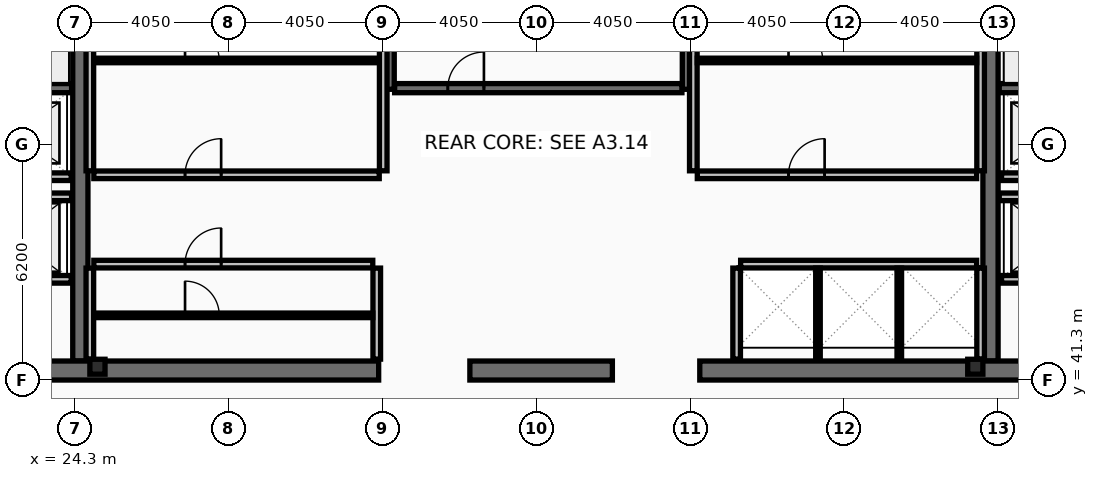
"""IFC4 building model, lengths in metres.
Left out: names, types, materials, properties, quantities, classifications, styles, units other than length and angle.
Written with IfcOpenShell. Run it as: python <this file> out.ifc"""

import sys

from ifc_helpers import new_model, si_unit, direction, frame, frame_2d, origin, origin_2d, place, context, subcontext, project, spatial, rectangle, i_section, extrude, element, fill, save


model = new_model("IFC4")
c1 = context("Model", 3, precision=1e-05, world=origin(), true_north=direction((0.0, 1.0)))
c2 = subcontext(c1, "Body", "Model", "MODEL_VIEW")
j1 = project(units=[si_unit("LENGTHUNIT", "METRE"), si_unit("PLANEANGLEUNIT", "RADIAN")], contexts=[c1])
p1 = place(None, origin())
s1 = spatial("IfcSite", under=j1, at=p1, CompositionType="ELEMENT")
p2 = place(p1, origin())
s2 = spatial("IfcBuilding", under=s1, at=p2, CompositionType="ELEMENT")
p3 = place(p2, frame((0.0, 0.0, 350.6)))
s3 = spatial("IfcBuildingStorey", under=s2, at=p3, CompositionType="ELEMENT", Elevation=350.6)
for number, where, z_axis, x_axis in (
    (1, (24.45, 41.8, 0.0), (0.0, 0.0, 1.0), (0.0, 1.0, 0.0)),
    (2, (48.4, 41.8, 0.0), (0.0, 0.0, 1.0), (0.0, 1.0, 0.0)),
):
    element("IfcWall", number, at=place(p3, frame(where, z_axis=z_axis, x_axis=x_axis)), inside=s3, PredefinedType="SHEAR", context=c2, shape_type="SweptSolid", body=[
        extrude(rectangle(XDim=11.4, YDim=0.4, at=frame_2d((5.7, 0.0))), origin(), (0.0, 0.0, 1.0), 5.4),
    ])
p4 = place(p3, frame((32.3, 41.55, 0.0), z_axis=(0.0, 0.0, 1.0), x_axis=(-1.0, 0.0, 0.0)))
e3 = element("IfcWall", 3, at=p4, inside=s3, PredefinedType="SHEAR", context=c2, shape_type="SweptSolid", body=[
    extrude(rectangle(XDim=11.45, YDim=0.5, at=frame_2d((5.725, 0.0))), origin(), (0.0, 0.0, 1.0), 5.4),
])
p5 = place(p3, frame((38.45, 41.55, 0.0), z_axis=(0.0, 0.0, 1.0), x_axis=(-1.0, 0.0, 0.0)))
e4 = element("IfcWall", 4, at=p5, inside=s3, PredefinedType="SHEAR", context=c2, shape_type="SweptSolid", body=[
    extrude(rectangle(XDim=3.75, YDim=0.5, at=frame_2d((1.875, 0.0))), origin(), (0.0, 0.0, 1.0), 5.4),
])
p6 = place(p3, frame((52.05, 41.55, 0.0), z_axis=(0.0, 0.0, 1.0), x_axis=(-1.0, 0.0, 0.0)))
e5 = element("IfcWall", 5, at=p6, inside=s3, PredefinedType="SHEAR", context=c2, shape_type="SweptSolid", body=[
    extrude(rectangle(XDim=11.3, YDim=0.5, at=frame_2d((5.65, 0.0))), origin(), (0.0, 0.0, 1.0), 5.4),
])
for number, where, z_axis, x_axis in (
    (6, (32.58, 48.95, 0.0), (0.0, 0.0, 1.0), (0.0, 1.0, 0.0)),
    (7, (40.42, 48.95, 0.0), (0.0, 0.0, 1.0), (0.0, 1.0, 0.0)),
):
    element("IfcWall", number, at=place(p3, frame(where, z_axis=z_axis, x_axis=x_axis)), inside=s3, PredefinedType="SHEAR", context=c2, shape_type="SweptSolid", body=[
        extrude(rectangle(XDim=4.25, YDim=0.26, at=frame_2d((2.125, 0.0))), origin(), (0.0, 0.0, 1.0), 5.4),
    ])
p7 = place(p3, frame((16.7, 48.98, 0.0), z_axis=(0.0, 0.0, 1.0), x_axis=(1.0, 0.0, 0.0)))
e8 = element("IfcWall", 8, at=p7, inside=s3, PredefinedType="SHEAR", context=c2, shape_type="SweptSolid", body=[
    extrude(rectangle(XDim=7.52, YDim=0.24, at=frame_2d((3.76, 0.0))), origin(), (0.0, 0.0, 1.0), 5.4),
])
p8 = place(p7, frame((0.22, 0.0, 0.0)))
e9 = element("IfcOpeningElement", 9, at=p8, cuts=e8, PredefinedType="OPENING", context=c2, shape_type="SweptSolid", body=[
    extrude(rectangle(XDim=1.05, YDim=2.15, at=frame_2d((0.525, 1.075))), frame((0.0, 0.13, 0.0), z_axis=(0.0, -1.0, 0.0), x_axis=(1.0, 0.0, 0.0)), (0.0, 0.0, 1.0), 0.26),
])
p9 = place(p3, frame((48.63, 48.98, 0.0), z_axis=(0.0, 0.0, 1.0), x_axis=(1.0, 0.0, 0.0)))
e10 = element("IfcWall", 10, at=p9, inside=s3, PredefinedType="SHEAR", context=c2, shape_type="SweptSolid", body=[
    extrude(rectangle(XDim=7.57, YDim=0.24, at=frame_2d((3.785, 0.0))), origin(), (0.0, 0.0, 1.0), 5.4),
])
p10 = place(p9, frame((6.3, 0.0, 0.0)))
e11 = element("IfcOpeningElement", 11, at=p10, cuts=e10, PredefinedType="OPENING", context=c2, shape_type="SweptSolid", body=[
    extrude(rectangle(XDim=1.05, YDim=2.15, at=frame_2d((0.525, 1.075))), frame((0.0, 0.13, 0.0), z_axis=(0.0, -1.0, 0.0), x_axis=(1.0, 0.0, 0.0)), (0.0, 0.0, 1.0), 0.26),
])
p11 = place(p3, frame((32.72, 48.98, 0.0), z_axis=(0.0, 0.0, 1.0), x_axis=(1.0, 0.0, 0.0)))
e12 = element("IfcWall", 12, at=p11, inside=s3, PredefinedType="SHEAR", context=c2, shape_type="SweptSolid", body=[
    extrude(rectangle(XDim=7.56, YDim=0.24, at=frame_2d((3.78, 0.0))), origin(), (0.0, 0.0, 1.0), 5.4),
])
p12 = place(p11, frame((1.4, 0.0, 0.0)))
e13 = element("IfcOpeningElement", 13, at=p12, cuts=e12, PredefinedType="OPENING", context=c2, shape_type="SweptSolid", body=[
    extrude(rectangle(XDim=0.95, YDim=2.1, at=frame_2d((0.475, 1.05))), frame((0.0, 0.13, 0.0), z_axis=(0.0, -1.0, 0.0), x_axis=(1.0, 0.0, 0.0)), (0.0, 0.0, 1.0), 0.26),
])
for number, where, z_axis, x_axis in (
    (14, (24.9, 41.65, 0.0), (0.0, 0.0, 1.0), (1.0, 0.0, 0.0)),
    (15, (48.0, 41.65, 0.0), (0.0, 0.0, 1.0), (1.0, 0.0, 0.0)),
):
    element("IfcColumn", number, at=place(p3, frame(where, z_axis=z_axis, x_axis=x_axis)), inside=s3, PredefinedType="COLUMN", context=c2, shape_type="SweptSolid", body=[
        extrude(i_section(OverallWidth=0.399, OverallDepth=0.393, WebThickness=0.023, FlangeThickness=0.037, at=origin_2d()), origin(), (0.0, 0.0, 1.0), 5.6),
    ])
p13 = place(p3, frame((51.61, 43.95, 0.0), z_axis=(0.0, 0.0, 1.0), x_axis=(-1.0, 0.0, 0.0)))
e16 = element("IfcWall", 16, at=p13, inside=s3, PredefinedType="PARTITIONING", context=c2, shape_type="SweptSolid", body=[
    extrude(rectangle(XDim=2.92, YDim=0.2, at=frame_2d((1.46, 0.0))), origin(), (0.0, 0.0, 1.0), 5.4),
])
p14 = place(p13, frame((0.81, 0.0, 0.0)))
e17 = element("IfcOpeningElement", 17, at=p14, cuts=e16, PredefinedType="OPENING", context=c2, shape_type="SweptSolid", body=[
    extrude(rectangle(XDim=1.3, YDim=2.18, at=frame_2d((0.65, 1.09))), frame((0.0, 0.11, 0.0), z_axis=(0.0, -1.0, 0.0), x_axis=(1.0, 0.0, 0.0)), (0.0, 0.0, 1.0), 0.22),
])
p15 = place(p3, frame((24.21, 43.95, 0.0), z_axis=(0.0, 0.0, 1.0), x_axis=(-1.0, 0.0, 0.0)))
e18 = element("IfcWall", 18, at=p15, inside=s3, PredefinedType="PARTITIONING", context=c2, shape_type="SweptSolid", body=[
    extrude(rectangle(XDim=2.97, YDim=0.2, at=frame_2d((1.485, 0.0))), origin(), (0.0, 0.0, 1.0), 5.4),
])
p16 = place(p15, frame((0.86, 0.0, 0.0)))
e19 = element("IfcOpeningElement", 19, at=p16, cuts=e18, PredefinedType="OPENING", context=c2, shape_type="SweptSolid", body=[
    extrude(rectangle(XDim=1.3, YDim=2.18, at=frame_2d((0.65, 1.09))), frame((0.0, 0.11, 0.0), z_axis=(0.0, -1.0, 0.0), x_axis=(1.0, 0.0, 0.0)), (0.0, 0.0, 1.0), 0.22),
])
p17 = place(p3, frame((51.61, 46.65, 0.0), z_axis=(0.0, 0.0, 1.0), x_axis=(-1.0, 0.0, 0.0)))
e20 = element("IfcWall", 20, at=p17, inside=s3, PredefinedType="PARTITIONING", context=c2, shape_type="SweptSolid", body=[
    extrude(rectangle(XDim=2.92, YDim=0.2, at=frame_2d((1.46, 0.0))), origin(), (0.0, 0.0, 1.0), 5.4),
])
p18 = place(p17, frame((0.86, 0.0, 0.0)))
e21 = element("IfcOpeningElement", 21, at=p18, cuts=e20, PredefinedType="OPENING", context=c2, shape_type="SweptSolid", body=[
    extrude(rectangle(XDim=1.2, YDim=2.18, at=frame_2d((0.6, 1.09))), frame((0.0, 0.11, 0.0), z_axis=(0.0, -1.0, 0.0), x_axis=(1.0, 0.0, 0.0)), (0.0, 0.0, 1.0), 0.22),
])
p19 = place(p3, frame((24.21, 46.65, 0.0), z_axis=(0.0, 0.0, 1.0), x_axis=(-1.0, 0.0, 0.0)))
e22 = element("IfcWall", 22, at=p19, inside=s3, PredefinedType="PARTITIONING", context=c2, shape_type="SweptSolid", body=[
    extrude(rectangle(XDim=2.97, YDim=0.2, at=frame_2d((1.485, 0.0))), origin(), (0.0, 0.0, 1.0), 5.4),
])
p20 = place(p19, frame((0.91, 0.0, 0.0)))
e23 = element("IfcOpeningElement", 23, at=p20, cuts=e22, PredefinedType="OPENING", context=c2, shape_type="SweptSolid", body=[
    extrude(rectangle(XDim=1.2, YDim=2.18, at=frame_2d((0.6, 1.09))), frame((0.0, 0.11, 0.0), z_axis=(0.0, -1.0, 0.0), x_axis=(1.0, 0.0, 0.0)), (0.0, 0.0, 1.0), 0.22),
])
p21 = place(p3, frame((21.2, 46.12, 0.0), z_axis=(0.0, 0.0, 1.0), x_axis=(1.0, 0.0, 0.0)))
e24 = element("IfcWall", 24, at=p21, inside=s3, PredefinedType="PARTITIONING", context=c2, shape_type="SweptSolid", body=[
    extrude(rectangle(XDim=3.02, YDim=0.2, at=frame_2d((1.51, 0.0))), origin(), (0.0, 0.0, 1.0), 5.4),
])
p22 = place(p3, frame((48.63, 46.12, 0.0), z_axis=(0.0, 0.0, 1.0), x_axis=(1.0, 0.0, 0.0)))
e25 = element("IfcWall", 25, at=p22, inside=s3, PredefinedType="PARTITIONING", context=c2, shape_type="SweptSolid", body=[
    extrude(rectangle(XDim=3.07, YDim=0.2, at=frame_2d((1.535, 0.0))), origin(), (0.0, 0.0, 1.0), 5.4),
])
for number, where, z_axis, x_axis in (
    (26, (24.7, 46.805, 0.0), (0.0, 0.0, 1.0), (0.0, 1.0, 0.0)),
    (27, (32.42, 46.805, 0.0), (0.0, 0.0, 1.0), (0.0, 1.0, 0.0)),
):
    element("IfcWall", number, at=place(p3, frame(where, z_axis=z_axis, x_axis=x_axis)), inside=s3, PredefinedType="PARTITIONING", context=c2, shape_type="SweptSolid", body=[
        extrude(rectangle(XDim=5.99, YDim=0.2, at=frame_2d((2.995, 0.0))), origin(), (0.0, 0.0, 1.0), 5.4),
    ])
p23 = place(p3, frame((24.805, 49.709, 0.0), z_axis=(0.0, 0.0, 1.0), x_axis=(1.0, 0.0, 0.0)))
e28 = element("IfcWall", 28, at=p23, inside=s3, PredefinedType="PARTITIONING", context=c2, shape_type="SweptSolid", body=[
    extrude(rectangle(XDim=7.51, YDim=0.12, at=frame_2d((3.755, 0.0))), origin(), (0.0, 0.0, 1.0), 5.4),
])
p24 = place(p23, frame((2.4, 0.0, 0.0)))
e29 = element("IfcOpeningElement", 29, at=p24, cuts=e28, PredefinedType="OPENING", context=c2, shape_type="SweptSolid", body=[
    extrude(rectangle(XDim=0.9, YDim=2.05, at=frame_2d((0.45, 1.025))), frame((0.0, 0.07, 0.0), z_axis=(0.0, -1.0, 0.0), x_axis=(1.0, 0.0, 0.0)), (0.0, 0.0, 1.0), 0.14),
])
p25 = place(p3, frame((24.805, 46.7, 0.0), z_axis=(0.0, 0.0, 1.0), x_axis=(1.0, 0.0, 0.0)))
e30 = element("IfcWall", 30, at=p25, inside=s3, PredefinedType="PARTITIONING", context=c2, shape_type="SweptSolid", body=[
    extrude(rectangle(XDim=7.51, YDim=0.2, at=frame_2d((3.755, 0.0))), origin(), (0.0, 0.0, 1.0), 5.4),
])
p26 = place(p25, frame((2.4, 0.0, 0.0)))
e31 = element("IfcOpeningElement", 31, at=p26, cuts=e30, PredefinedType="OPENING", context=c2, shape_type="SweptSolid", body=[
    extrude(rectangle(XDim=0.95, YDim=2.1, at=frame_2d((0.475, 1.05))), frame((0.0, 0.11, 0.0), z_axis=(0.0, -1.0, 0.0), x_axis=(1.0, 0.0, 0.0)), (0.0, 0.0, 1.0), 0.22),
])
for number, where, z_axis, x_axis in (
    (32, (24.7, 41.85, 0.0), (0.0, 0.0, 1.0), (0.0, 1.0, 0.0)),
    (33, (32.25, 41.85, 0.0), (0.0, 0.0, 1.0), (0.0, 1.0, 0.0)),
):
    element("IfcWall", number, at=place(p3, frame(where, z_axis=z_axis, x_axis=x_axis)), inside=s3, PredefinedType="PARTITIONING", context=c2, shape_type="SweptSolid", body=[
        extrude(rectangle(XDim=2.395, YDim=0.2, at=frame_2d((1.198, 0.0))), origin(), (0.0, 0.0, 1.0), 5.4),
    ])
p27 = place(p3, frame((24.805, 43.002, 0.0), z_axis=(0.0, 0.0, 1.0), x_axis=(1.0, 0.0, 0.0)))
e34 = element("IfcWall", 34, at=p27, inside=s3, PredefinedType="PARTITIONING", context=c2, shape_type="SweptSolid", body=[
    extrude(rectangle(XDim=7.34, YDim=0.12, at=frame_2d((3.67, 0.0))), origin(), (0.0, 0.0, 1.0), 5.4),
])
p28 = place(p27, frame((2.4, 0.0, 0.0)))
e35 = element("IfcOpeningElement", 35, at=p28, cuts=e34, PredefinedType="OPENING", context=c2, shape_type="SweptSolid", body=[
    extrude(rectangle(XDim=0.9, YDim=2.05, at=frame_2d((0.45, 1.025))), frame((0.0, 0.07, 0.0), z_axis=(0.0, -1.0, 0.0), x_axis=(1.0, 0.0, 0.0)), (0.0, 0.0, 1.0), 0.14),
])
p29 = place(p3, frame((24.805, 44.35, 0.0), z_axis=(0.0, 0.0, 1.0), x_axis=(1.0, 0.0, 0.0)))
e36 = element("IfcWall", 36, at=p29, inside=s3, PredefinedType="PARTITIONING", context=c2, shape_type="SweptSolid", body=[
    extrude(rectangle(XDim=7.34, YDim=0.2, at=frame_2d((3.67, 0.0))), origin(), (0.0, 0.0, 1.0), 5.4),
])
p30 = place(p29, frame((2.4, 0.0, 0.0)))
e37 = element("IfcOpeningElement", 37, at=p30, cuts=e36, PredefinedType="OPENING", context=c2, shape_type="SweptSolid", body=[
    extrude(rectangle(XDim=0.95, YDim=2.1, at=frame_2d((0.475, 1.05))), frame((0.0, 0.11, 0.0), z_axis=(0.0, -1.0, 0.0), x_axis=(1.0, 0.0, 0.0)), (0.0, 0.0, 1.0), 0.22),
])
for number, where, z_axis, x_axis in (
    (38, (40.58, 46.805, 0.0), (0.0, 0.0, 1.0), (0.0, 1.0, 0.0)),
    (39, (48.14, 46.805, 0.0), (0.0, 0.0, 1.0), (0.0, 1.0, 0.0)),
):
    element("IfcWall", number, at=place(p3, frame(where, z_axis=z_axis, x_axis=x_axis)), inside=s3, PredefinedType="PARTITIONING", context=c2, shape_type="SweptSolid", body=[
        extrude(rectangle(XDim=5.99, YDim=0.2, at=frame_2d((2.995, 0.0))), origin(), (0.0, 0.0, 1.0), 5.4),
    ])
p31 = place(p3, frame((40.685, 49.709, 0.0), z_axis=(0.0, 0.0, 1.0), x_axis=(1.0, 0.0, 0.0)))
e40 = element("IfcWall", 40, at=p31, inside=s3, PredefinedType="PARTITIONING", context=c2, shape_type="SweptSolid", body=[
    extrude(rectangle(XDim=7.35, YDim=0.12, at=frame_2d((3.675, 0.0))), origin(), (0.0, 0.0, 1.0), 5.4),
])
p32 = place(p31, frame((2.4, 0.0, 0.0)))
e41 = element("IfcOpeningElement", 41, at=p32, cuts=e40, PredefinedType="OPENING", context=c2, shape_type="SweptSolid", body=[
    extrude(rectangle(XDim=0.9, YDim=2.05, at=frame_2d((0.45, 1.025))), frame((0.0, 0.07, 0.0), z_axis=(0.0, -1.0, 0.0), x_axis=(1.0, 0.0, 0.0)), (0.0, 0.0, 1.0), 0.14),
])
p33 = place(p3, frame((40.685, 46.7, 0.0), z_axis=(0.0, 0.0, 1.0), x_axis=(1.0, 0.0, 0.0)))
e42 = element("IfcWall", 42, at=p33, inside=s3, PredefinedType="PARTITIONING", context=c2, shape_type="SweptSolid", body=[
    extrude(rectangle(XDim=7.35, YDim=0.2, at=frame_2d((3.675, 0.0))), origin(), (0.0, 0.0, 1.0), 5.4),
])
p34 = place(p33, frame((2.4, 0.0, 0.0)))
e43 = element("IfcOpeningElement", 43, at=p34, cuts=e42, PredefinedType="OPENING", context=c2, shape_type="SweptSolid", body=[
    extrude(rectangle(XDim=0.95, YDim=2.1, at=frame_2d((0.475, 1.05))), frame((0.0, 0.11, 0.0), z_axis=(0.0, -1.0, 0.0), x_axis=(1.0, 0.0, 0.0)), (0.0, 0.0, 1.0), 0.22),
])
p35 = place(p3, frame((41.825, 44.35, 0.0), z_axis=(0.0, 0.0, 1.0), x_axis=(1.0, 0.0, 0.0)))
e44 = element("IfcWall", 44, at=p35, inside=s3, PredefinedType="PARTITIONING", context=c2, shape_type="SweptSolid", body=[
    extrude(rectangle(XDim=6.21, YDim=0.2, at=frame_2d((3.105, 0.0))), origin(), (0.0, 0.0, 1.0), 5.4),
])
for number, where, z_axis, x_axis in (
    (45, (41.72, 41.85, 0.0), (0.0, 0.0, 1.0), (0.0, 1.0, 0.0)),
    (46, (48.14, 41.85, 0.0), (0.0, 0.0, 1.0), (0.0, 1.0, 0.0)),
):
    element("IfcWall", number, at=place(p3, frame(where, z_axis=z_axis, x_axis=x_axis)), inside=s3, PredefinedType="PARTITIONING", context=c2, shape_type="SweptSolid", body=[
        extrude(rectangle(XDim=2.395, YDim=0.2, at=frame_2d((1.198, 0.0))), origin(), (0.0, 0.0, 1.0), 5.4),
    ])
for number, where, z_axis, x_axis in (
    (47, (43.86, 41.85, 0.0), (0.0, 0.0, 1.0), (0.0, 1.0, 0.0)),
    (48, (46.0, 41.85, 0.0), (0.0, 0.0, 1.0), (0.0, 1.0, 0.0)),
):
    element("IfcWall", number, at=place(p3, frame(where, z_axis=z_axis, x_axis=x_axis)), inside=s3, PredefinedType="PARTITIONING", context=c2, shape_type="SweptSolid", body=[
        extrude(rectangle(XDim=2.395, YDim=0.12, at=frame_2d((1.198, 0.0))), origin(), (0.0, 0.0, 1.0), 5.4),
    ])
p36 = place(p12, origin())
e49 = element("IfcDoor", 49, at=p36, inside=s3, OperationType="SINGLE_SWING_RIGHT", PredefinedType="DOOR", context=c2, shape_type="SweptSolid", body=[
    extrude(rectangle(XDim=0.95, YDim=2.1, at=frame_2d((0.475, 1.05))), frame((0.0, 0.025, 0.0), z_axis=(0.0, -1.0, 0.0), x_axis=(1.0, 0.0, 0.0)), (0.0, 0.0, 1.0), 0.05),
])
fill(e13, e49)
p37 = place(p24, origin())
e50 = element("IfcDoor", 50, at=p37, inside=s3, OperationType="SINGLE_SWING_LEFT", PredefinedType="DOOR", context=c2, shape_type="SweptSolid", body=[
    extrude(rectangle(XDim=0.9, YDim=2.05, at=frame_2d((0.45, 1.025))), frame((0.0, 0.025, 0.0), z_axis=(0.0, -1.0, 0.0), x_axis=(1.0, 0.0, 0.0)), (0.0, 0.0, 1.0), 0.05),
])
fill(e29, e50)
p38 = place(p26, origin())
e51 = element("IfcDoor", 51, at=p38, inside=s3, OperationType="SINGLE_SWING_RIGHT", PredefinedType="DOOR", context=c2, shape_type="SweptSolid", body=[
    extrude(rectangle(XDim=0.95, YDim=2.1, at=frame_2d((0.475, 1.05))), frame((0.0, 0.025, 0.0), z_axis=(0.0, -1.0, 0.0), x_axis=(1.0, 0.0, 0.0)), (0.0, 0.0, 1.0), 0.05),
])
fill(e31, e51)
p39 = place(p28, origin())
e52 = element("IfcDoor", 52, at=p39, inside=s3, OperationType="SINGLE_SWING_LEFT", PredefinedType="DOOR", context=c2, shape_type="SweptSolid", body=[
    extrude(rectangle(XDim=0.9, YDim=2.05, at=frame_2d((0.45, 1.025))), frame((0.0, 0.025, 0.0), z_axis=(0.0, -1.0, 0.0), x_axis=(1.0, 0.0, 0.0)), (0.0, 0.0, 1.0), 0.05),
])
fill(e35, e52)
p40 = place(p30, origin())
e53 = element("IfcDoor", 53, at=p40, inside=s3, OperationType="SINGLE_SWING_RIGHT", PredefinedType="DOOR", context=c2, shape_type="SweptSolid", body=[
    extrude(rectangle(XDim=0.95, YDim=2.1, at=frame_2d((0.475, 1.05))), frame((0.0, 0.025, 0.0), z_axis=(0.0, -1.0, 0.0), x_axis=(1.0, 0.0, 0.0)), (0.0, 0.0, 1.0), 0.05),
])
fill(e37, e53)
p41 = place(p32, origin())
e54 = element("IfcDoor", 54, at=p41, inside=s3, OperationType="SINGLE_SWING_LEFT", PredefinedType="DOOR", context=c2, shape_type="SweptSolid", body=[
    extrude(rectangle(XDim=0.9, YDim=2.05, at=frame_2d((0.45, 1.025))), frame((0.0, 0.025, 0.0), z_axis=(0.0, -1.0, 0.0), x_axis=(1.0, 0.0, 0.0)), (0.0, 0.0, 1.0), 0.05),
])
fill(e41, e54)
p42 = place(p34, origin())
e55 = element("IfcDoor", 55, at=p42, inside=s3, OperationType="SINGLE_SWING_RIGHT", PredefinedType="DOOR", context=c2, shape_type="SweptSolid", body=[
    extrude(rectangle(XDim=0.95, YDim=2.1, at=frame_2d((0.475, 1.05))), frame((0.0, 0.025, 0.0), z_axis=(0.0, -1.0, 0.0), x_axis=(1.0, 0.0, 0.0)), (0.0, 0.0, 1.0), 0.05),
])
fill(e43, e55)
save(model, sys.argv[1])
